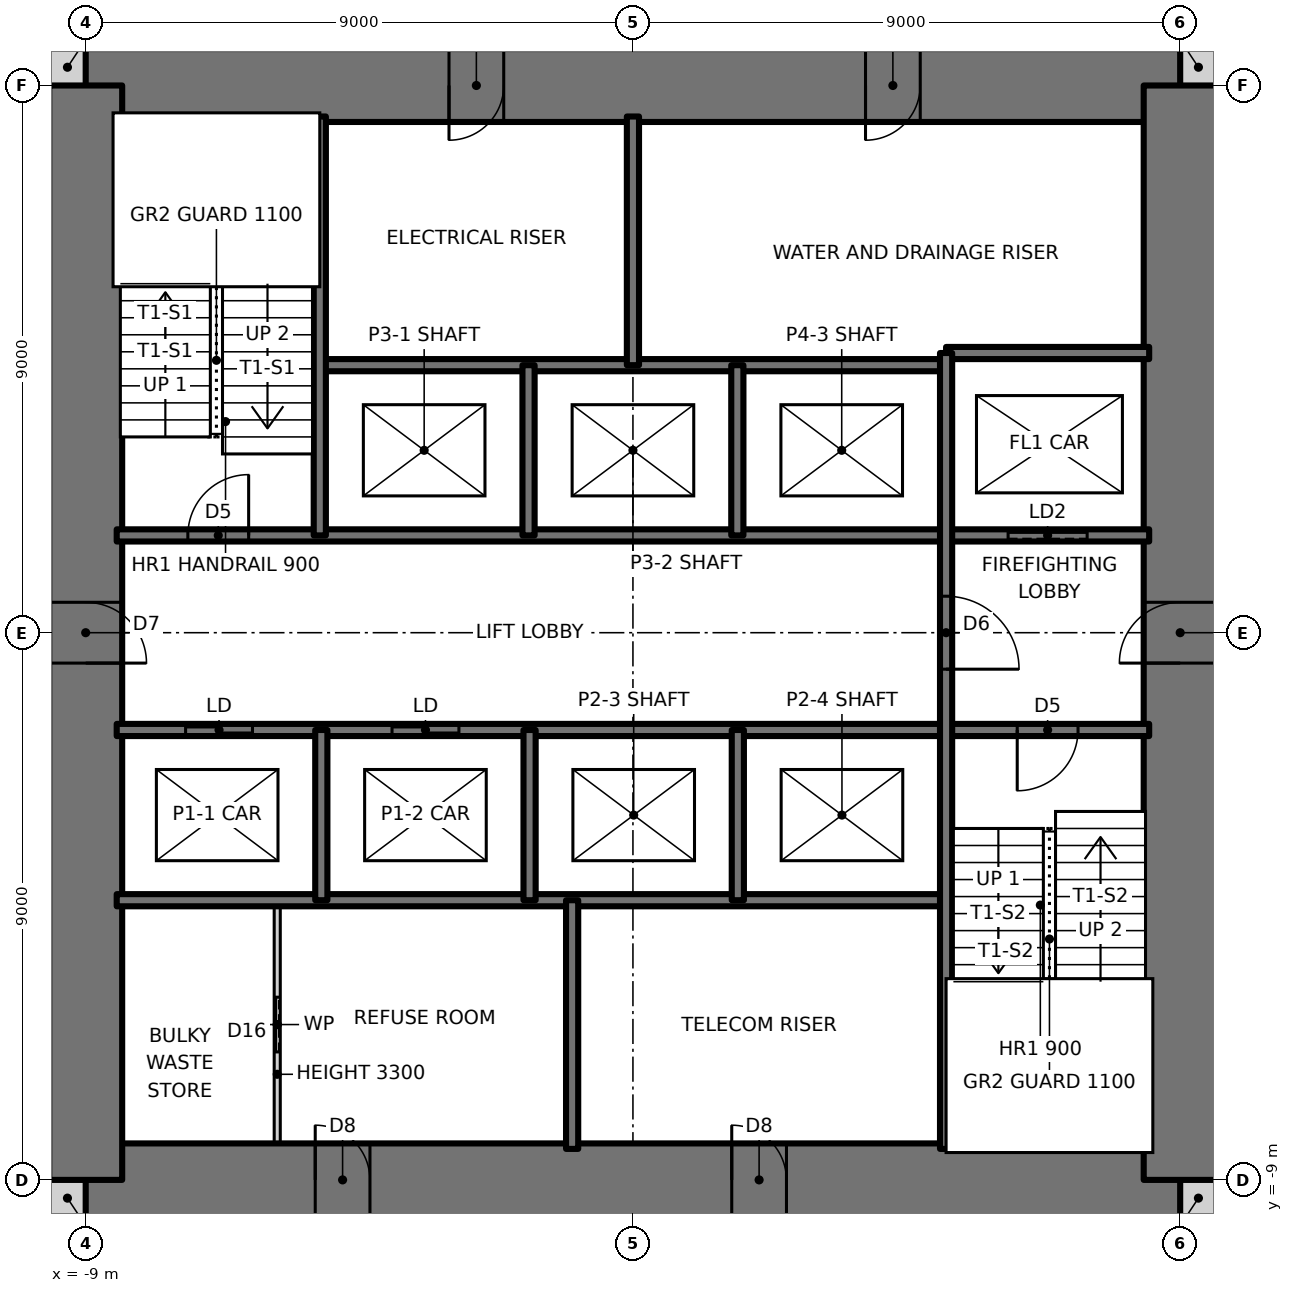
"""IFC4 building model, lengths in metres.
Left out: names, types, materials, properties, quantities, classifications, styles, units other than length and angle.
Written with IfcOpenShell. Run it as: python <this file> out.ifc"""

import sys

from ifc_helpers import new_model, si_unit, direction, frame, frame_2d, origin, place, context, subcontext, project, spatial, rectangle, extrude, element, fill, save


model = new_model("IFC4")
c1 = context("Model", 3, precision=1e-05, world=origin(), true_north=direction((0.0, 1.0)))
c2 = subcontext(c1, "Body", "Model", "MODEL_VIEW")
j1 = project(units=[si_unit("LENGTHUNIT", "METRE"), si_unit("PLANEANGLEUNIT", "RADIAN")], contexts=[c1])
p1 = place(None, origin())
s1 = spatial("IfcSite", under=j1, at=p1, CompositionType="ELEMENT")
p2 = place(p1, origin())
s2 = spatial("IfcBuilding", under=s1, at=p2, CompositionType="ELEMENT")
p3 = place(p2, frame((0.0, 0.0, 57.0)))
s3 = spatial("IfcBuildingStorey", under=s2, at=p3, CompositionType="ELEMENT", Elevation=57.0)
for number, where, z_axis, x_axis in (
    (1, (-9.6, -9.3, 0.0), (0.0, 0.0, 1.0), (1.0, 0.0, 0.0)),
    (2, (9.0, -9.3, 0.0), (0.0, 0.0, 1.0), (1.0, 0.0, 0.0)),
    (3, (9.0, 9.3, 0.0), (0.0, 0.0, 1.0), (1.0, 0.0, 0.0)),
    (4, (-9.6, 9.3, 0.0), (0.0, 0.0, 1.0), (1.0, 0.0, 0.0)),
):
    element("IfcWall", number, at=place(p3, frame(where, z_axis=z_axis, x_axis=x_axis)), inside=s3, PredefinedType="SOLIDWALL", context=c2, shape_type="SweptSolid", body=[
        extrude(rectangle(XDim=0.6, YDim=0.6, at=frame_2d((0.3, 0.0))), origin(), (0.0, 0.0, 1.0), 3.5),
    ])
p4 = place(p3, frame((-9.0, -9.0, 0.0), z_axis=(0.0, 0.0, 1.0), x_axis=(1.0, 0.0, 0.0)))
e5 = element("IfcWall", 5, at=p4, inside=s3, PredefinedType="SHEAR", context=c2, shape_type="SweptSolid", body=[
    extrude(rectangle(XDim=18.0, YDim=1.2, at=frame_2d((9.0, 0.0))), origin(), (0.0, 0.0, 1.0), 3.5),
])
p5 = place(p4, frame((3.775, 0.0, 0.0)))
e6 = element("IfcOpeningElement", 6, at=p5, cuts=e5, PredefinedType="OPENING", context=c2, shape_type="SweptSolid", body=[
    extrude(rectangle(XDim=0.9, YDim=2.1, at=frame_2d((0.45, 1.05))), frame((0.0, 0.61, 0.0), z_axis=(0.0, -1.0, 0.0), x_axis=(1.0, 0.0, 0.0)), (0.0, 0.0, 1.0), 1.22),
])
p6 = place(p4, frame((10.625, 0.0, 0.0)))
e7 = element("IfcOpeningElement", 7, at=p6, cuts=e5, PredefinedType="OPENING", context=c2, shape_type="SweptSolid", body=[
    extrude(rectangle(XDim=0.9, YDim=2.1, at=frame_2d((0.45, 1.05))), frame((0.0, 0.61, 0.0), z_axis=(0.0, -1.0, 0.0), x_axis=(1.0, 0.0, 0.0)), (0.0, 0.0, 1.0), 1.22),
])
p7 = place(p3, frame((9.0, 9.0, 0.0), z_axis=(0.0, 0.0, 1.0), x_axis=(-1.0, 0.0, 0.0)))
e8 = element("IfcWall", 8, at=p7, inside=s3, PredefinedType="SHEAR", context=c2, shape_type="SweptSolid", body=[
    extrude(rectangle(XDim=18.0, YDim=1.2, at=frame_2d((9.0, 0.0))), origin(), (0.0, 0.0, 1.0), 3.5),
])
p8 = place(p7, frame((11.125, 0.0, 0.0)))
e9 = element("IfcOpeningElement", 9, at=p8, cuts=e8, PredefinedType="OPENING", context=c2, shape_type="SweptSolid", body=[
    extrude(rectangle(XDim=0.9, YDim=2.1, at=frame_2d((0.45, 1.05))), frame((0.0, 0.61, 0.0), z_axis=(0.0, -1.0, 0.0), x_axis=(1.0, 0.0, 0.0)), (0.0, 0.0, 1.0), 1.22),
])
p9 = place(p7, frame((4.275, 0.0, 0.0)))
e10 = element("IfcOpeningElement", 10, at=p9, cuts=e8, PredefinedType="OPENING", context=c2, shape_type="SweptSolid", body=[
    extrude(rectangle(XDim=0.9, YDim=2.1, at=frame_2d((0.45, 1.05))), frame((0.0, 0.61, 0.0), z_axis=(0.0, -1.0, 0.0), x_axis=(1.0, 0.0, 0.0)), (0.0, 0.0, 1.0), 1.22),
])
p10 = place(p3, frame((9.0, -9.0, 0.0), z_axis=(0.0, 0.0, 1.0), x_axis=(0.0, 1.0, 0.0)))
e11 = element("IfcWall", 11, at=p10, inside=s3, PredefinedType="SHEAR", context=c2, shape_type="SweptSolid", body=[
    extrude(rectangle(XDim=18.0, YDim=1.2, at=frame_2d((9.0, 0.0))), origin(), (0.0, 0.0, 1.0), 3.5),
])
p11 = place(p10, frame((8.5, 0.0, 0.0)))
e12 = element("IfcOpeningElement", 12, at=p11, cuts=e11, PredefinedType="OPENING", context=c2, shape_type="SweptSolid", body=[
    extrude(rectangle(XDim=1.0, YDim=2.1, at=frame_2d((0.5, 1.05))), frame((0.0, 0.61, 0.0), z_axis=(0.0, -1.0, 0.0), x_axis=(1.0, 0.0, 0.0)), (0.0, 0.0, 1.0), 1.22),
])
p12 = place(p3, frame((-9.0, 9.0, 0.0), z_axis=(0.0, 0.0, 1.0), x_axis=(0.0, -1.0, 0.0)))
e13 = element("IfcWall", 13, at=p12, inside=s3, PredefinedType="SHEAR", context=c2, shape_type="SweptSolid", body=[
    extrude(rectangle(XDim=18.0, YDim=1.2, at=frame_2d((9.0, 0.0))), origin(), (0.0, 0.0, 1.0), 3.5),
])
p13 = place(p12, frame((8.5, 0.0, 0.0)))
e14 = element("IfcOpeningElement", 14, at=p13, cuts=e13, PredefinedType="OPENING", context=c2, shape_type="SweptSolid", body=[
    extrude(rectangle(XDim=1.0, YDim=2.1, at=frame_2d((0.5, 1.05))), frame((0.0, 0.61, 0.0), z_axis=(0.0, -1.0, 0.0), x_axis=(1.0, 0.0, 0.0)), (0.0, 0.0, 1.0), 1.22),
])
p14 = place(p3, frame((-8.49, -4.4, 0.0), z_axis=(0.0, 0.0, 1.0), x_axis=(1.0, 0.0, 0.0)))
e15 = element("IfcWall", 15, at=p14, inside=s3, PredefinedType="SOLIDWALL", context=c2, shape_type="SweptSolid", body=[
    extrude(rectangle(XDim=13.64, YDim=0.2, at=frame_2d((6.82, 0.0))), origin(), (0.0, 0.0, 1.0), 3.5),
])
p15 = place(p3, frame((-8.49, -1.6, 0.0), z_axis=(0.0, 0.0, 1.0), x_axis=(1.0, 0.0, 0.0)))
e16 = element("IfcWall", 16, at=p15, inside=s3, PredefinedType="SOLIDWALL", context=c2, shape_type="SweptSolid", body=[
    extrude(rectangle(XDim=16.98, YDim=0.2, at=frame_2d((8.49, 0.0))), origin(), (0.0, 0.0, 1.0), 3.5),
])
p16 = place(p15, frame((14.81, 0.0, 0.0)))
e17 = element("IfcOpeningElement", 17, at=p16, cuts=e16, PredefinedType="OPENING", context=c2, shape_type="SweptSolid", body=[
    extrude(rectangle(XDim=1.0, YDim=2.1, at=frame_2d((0.5, 1.05))), frame((0.0, 0.11, 0.0), z_axis=(0.0, -1.0, 0.0), x_axis=(1.0, 0.0, 0.0)), (0.0, 0.0, 1.0), 0.22),
])
p17 = place(p15, frame((1.133, 0.0, 0.0)))
e18 = element("IfcOpeningElement", 18, at=p17, cuts=e16, PredefinedType="OPENING", context=c2, shape_type="SweptSolid", body=[
    extrude(rectangle(XDim=1.1, YDim=2.1, at=frame_2d((0.55, 1.05))), frame((0.0, 0.11, 0.0), z_axis=(0.0, -1.0, 0.0), x_axis=(1.0, 0.0, 0.0)), (0.0, 0.0, 1.0), 0.22),
])
p18 = place(p15, frame((4.528, 0.0, 0.0)))
e19 = element("IfcOpeningElement", 19, at=p18, cuts=e16, PredefinedType="OPENING", context=c2, shape_type="SweptSolid", body=[
    extrude(rectangle(XDim=1.1, YDim=2.1, at=frame_2d((0.55, 1.05))), frame((0.0, 0.11, 0.0), z_axis=(0.0, -1.0, 0.0), x_axis=(1.0, 0.0, 0.0)), (0.0, 0.0, 1.0), 0.22),
])
p19 = place(p3, frame((-8.49, 1.6, 0.0), z_axis=(0.0, 0.0, 1.0), x_axis=(1.0, 0.0, 0.0)))
e20 = element("IfcWall", 20, at=p19, inside=s3, PredefinedType="SOLIDWALL", context=c2, shape_type="SweptSolid", body=[
    extrude(rectangle(XDim=16.98, YDim=0.2, at=frame_2d((8.49, 0.0))), origin(), (0.0, 0.0, 1.0), 3.5),
])
p20 = place(p19, frame((1.17, 0.0, 0.0)))
e21 = element("IfcOpeningElement", 21, at=p20, cuts=e20, PredefinedType="OPENING", context=c2, shape_type="SweptSolid", body=[
    extrude(rectangle(XDim=1.0, YDim=2.1, at=frame_2d((0.5, 1.05))), frame((0.0, 0.11, 0.0), z_axis=(0.0, -1.0, 0.0), x_axis=(1.0, 0.0, 0.0)), (0.0, 0.0, 1.0), 0.22),
])
p21 = place(p19, frame((14.66, 0.0, 0.0)))
e22 = element("IfcOpeningElement", 22, at=p21, cuts=e20, PredefinedType="OPENING", context=c2, shape_type="SweptSolid", body=[
    extrude(rectangle(XDim=1.3, YDim=2.1, at=frame_2d((0.65, 1.05))), frame((0.0, 0.11, 0.0), z_axis=(0.0, -1.0, 0.0), x_axis=(1.0, 0.0, 0.0)), (0.0, 0.0, 1.0), 0.22),
])
p22 = place(p3, frame((-5.15, 4.4, 0.0), z_axis=(0.0, 0.0, 1.0), x_axis=(1.0, 0.0, 0.0)))
e23 = element("IfcWall", 23, at=p22, inside=s3, PredefinedType="SOLIDWALL", context=c2, shape_type="SweptSolid", body=[
    extrude(rectangle(XDim=10.3, YDim=0.2, at=frame_2d((5.15, 0.0))), origin(), (0.0, 0.0, 1.0), 3.5),
])
p23 = place(p3, frame((5.15, 4.6, 0.0), z_axis=(0.0, 0.0, 1.0), x_axis=(1.0, 0.0, 0.0)))
e24 = element("IfcWall", 24, at=p23, inside=s3, PredefinedType="SOLIDWALL", context=c2, shape_type="SweptSolid", body=[
    extrude(rectangle(XDim=3.34, YDim=0.2, at=frame_2d((1.67, 0.0))), origin(), (0.0, 0.0, 1.0), 3.5),
])
p24 = place(p3, frame((5.15, -8.49, 0.0), z_axis=(0.0, 0.0, 1.0), x_axis=(0.0, 1.0, 0.0)))
e25 = element("IfcWall", 25, at=p24, inside=s3, PredefinedType="SOLIDWALL", context=c2, shape_type="SweptSolid", body=[
    extrude(rectangle(XDim=13.09, YDim=0.2, at=frame_2d((6.545, 0.0))), origin(), (0.0, 0.0, 1.0), 3.5),
])
p25 = place(p24, frame((7.89, 0.0, 0.0)))
e26 = element("IfcOpeningElement", 26, at=p25, cuts=e25, PredefinedType="OPENING", context=c2, shape_type="SweptSolid", body=[
    extrude(rectangle(XDim=1.2, YDim=2.1, at=frame_2d((0.6, 1.05))), frame((0.0, 0.11, 0.0), z_axis=(0.0, -1.0, 0.0), x_axis=(1.0, 0.0, 0.0)), (0.0, 0.0, 1.0), 0.22),
])
for number, where, z_axis, x_axis in (
    (27, (1.725, -4.4, 0.0), (0.0, 0.0, 1.0), (0.0, 1.0, 0.0)),
    (28, (1.717, 1.6, 0.0), (0.0, 0.0, 1.0), (0.0, 1.0, 0.0)),
):
    element("IfcWall", number, at=place(p3, frame(where, z_axis=z_axis, x_axis=x_axis)), inside=s3, PredefinedType="SOLIDWALL", context=c2, shape_type="SweptSolid", body=[
        extrude(rectangle(XDim=2.8, YDim=0.2, at=frame_2d((1.4, 0.0))), origin(), (0.0, 0.0, 1.0), 3.5),
    ])
for number, where, z_axis, x_axis in (
    (29, (0.0, 4.4, 0.0), (0.0, 0.0, 1.0), (0.0, 1.0, 0.0)),
    (30, (-1.0, -8.49, 0.0), (0.0, 0.0, 1.0), (0.0, 1.0, 0.0)),
):
    element("IfcWall", number, at=place(p3, frame(where, z_axis=z_axis, x_axis=x_axis)), inside=s3, PredefinedType="SOLIDWALL", context=c2, shape_type="SweptSolid", body=[
        extrude(rectangle(XDim=4.09, YDim=0.2, at=frame_2d((2.045, 0.0))), origin(), (0.0, 0.0, 1.0), 3.5),
    ])
for number, where, z_axis, x_axis in (
    (31, (-1.7, -4.4, 0.0), (0.0, 0.0, 1.0), (0.0, 1.0, 0.0)),
    (32, (-1.717, 1.6, 0.0), (0.0, 0.0, 1.0), (0.0, 1.0, 0.0)),
    (33, (-5.125, -4.4, 0.0), (0.0, 0.0, 1.0), (0.0, 1.0, 0.0)),
):
    element("IfcWall", number, at=place(p3, frame(where, z_axis=z_axis, x_axis=x_axis)), inside=s3, PredefinedType="SOLIDWALL", context=c2, shape_type="SweptSolid", body=[
        extrude(rectangle(XDim=2.8, YDim=0.2, at=frame_2d((1.4, 0.0))), origin(), (0.0, 0.0, 1.0), 3.5),
    ])
p26 = place(p3, frame((-5.15, 1.6, 0.0), z_axis=(0.0, 0.0, 1.0), x_axis=(0.0, 1.0, 0.0)))
e34 = element("IfcWall", 34, at=p26, inside=s3, PredefinedType="SOLIDWALL", context=c2, shape_type="SweptSolid", body=[
    extrude(rectangle(XDim=6.89, YDim=0.2, at=frame_2d((3.445, 0.0))), origin(), (0.0, 0.0, 1.0), 3.5),
])
p27 = place(p3, frame((-5.85, -8.49, 0.0), z_axis=(0.0, 0.0, 1.0), x_axis=(0.0, 1.0, 0.0)))
e35 = element("IfcWall", 35, at=p27, inside=s3, PredefinedType="PARTITIONING", context=c2, shape_type="SweptSolid", body=[
    extrude(rectangle(XDim=4.09, YDim=0.1, at=frame_2d((2.045, 0.0))), origin(), (0.0, 0.0, 1.0), 3.3),
])
p28 = place(p27, frame((1.595, 0.0, 0.0)))
e36 = element("IfcOpeningElement", 36, at=p28, cuts=e35, PredefinedType="OPENING", context=c2, shape_type="SweptSolid", body=[
    extrude(rectangle(XDim=0.9, YDim=2.1, at=frame_2d((0.45, 1.05))), frame((0.0, 0.06, 0.0), z_axis=(0.0, -1.0, 0.0), x_axis=(1.0, 0.0, 0.0)), (0.0, 0.0, 1.0), 0.12),
])
p29 = place(p20, origin())
e37 = element("IfcDoor", 37, at=p29, inside=s3, OperationType="SINGLE_SWING_RIGHT", PredefinedType="DOOR", context=c2, shape_type="SweptSolid", body=[
    extrude(rectangle(XDim=1.0, YDim=2.1, at=frame_2d((0.5, 1.05))), frame((0.0, 0.025, 0.0), z_axis=(0.0, -1.0, 0.0), x_axis=(1.0, 0.0, 0.0)), (0.0, 0.0, 1.0), 0.05),
])
fill(e21, e37)
p30 = place(p16, frame((1.0, 0.0, 0.0), z_axis=(0.0, 0.0, 1.0), x_axis=(-1.0, 0.0, 0.0)))
e38 = element("IfcDoor", 38, at=p30, inside=s3, OperationType="SINGLE_SWING_RIGHT", PredefinedType="DOOR", context=c2, shape_type="SweptSolid", body=[
    extrude(rectangle(XDim=1.0, YDim=2.1, at=frame_2d((0.5, 1.05))), frame((0.0, 0.025, 0.0), z_axis=(0.0, -1.0, 0.0), x_axis=(1.0, 0.0, 0.0)), (0.0, 0.0, 1.0), 0.05),
])
fill(e17, e38)
p31 = place(p25, frame((1.2, 0.0, 0.0), z_axis=(0.0, 0.0, 1.0), x_axis=(-1.0, 0.0, 0.0)))
e39 = element("IfcDoor", 39, at=p31, inside=s3, OperationType="SINGLE_SWING_RIGHT", PredefinedType="DOOR", context=c2, shape_type="SweptSolid", body=[
    extrude(rectangle(XDim=1.2, YDim=2.1, at=frame_2d((0.6, 1.05))), frame((0.0, 0.025, 0.0), z_axis=(0.0, -1.0, 0.0), x_axis=(1.0, 0.0, 0.0)), (0.0, 0.0, 1.0), 0.05),
])
fill(e26, e39)
p32 = place(p28, origin())
e40 = element("IfcDoor", 40, at=p32, inside=s3, OperationType="SLIDING_TO_LEFT", PredefinedType="DOOR", context=c2, shape_type="SweptSolid", body=[
    extrude(rectangle(XDim=0.9, YDim=2.1, at=frame_2d((0.45, 1.05))), frame((0.0, 0.025, 0.0), z_axis=(0.0, -1.0, 0.0), x_axis=(1.0, 0.0, 0.0)), (0.0, 0.0, 1.0), 0.05),
])
fill(e36, e40)
p33 = place(p13, origin())
e41 = element("IfcDoor", 41, at=p33, inside=s3, OperationType="SINGLE_SWING_RIGHT", PredefinedType="DOOR", context=c2, shape_type="SweptSolid", body=[
    extrude(rectangle(XDim=1.0, YDim=2.1, at=frame_2d((0.5, 1.05))), frame((0.0, 0.025, 0.0), z_axis=(0.0, -1.0, 0.0), x_axis=(1.0, 0.0, 0.0)), (0.0, 0.0, 1.0), 0.05),
])
fill(e14, e41)
p34 = place(p11, origin())
e42 = element("IfcDoor", 42, at=p34, inside=s3, OperationType="SINGLE_SWING_LEFT", PredefinedType="DOOR", context=c2, shape_type="SweptSolid", body=[
    extrude(rectangle(XDim=1.0, YDim=2.1, at=frame_2d((0.5, 1.05))), frame((0.0, 0.025, 0.0), z_axis=(0.0, -1.0, 0.0), x_axis=(1.0, 0.0, 0.0)), (0.0, 0.0, 1.0), 0.05),
])
fill(e12, e42)
p35 = place(p8, origin())
e43 = element("IfcDoor", 43, at=p35, inside=s3, OperationType="SINGLE_SWING_RIGHT", PredefinedType="DOOR", context=c2, shape_type="SweptSolid", body=[
    extrude(rectangle(XDim=0.9, YDim=2.1, at=frame_2d((0.45, 1.05))), frame((0.0, 0.025, 0.0), z_axis=(0.0, -1.0, 0.0), x_axis=(1.0, 0.0, 0.0)), (0.0, 0.0, 1.0), 0.05),
])
fill(e9, e43)
p36 = place(p9, origin())
e44 = element("IfcDoor", 44, at=p36, inside=s3, OperationType="SINGLE_SWING_RIGHT", PredefinedType="DOOR", context=c2, shape_type="SweptSolid", body=[
    extrude(rectangle(XDim=0.9, YDim=2.1, at=frame_2d((0.45, 1.05))), frame((0.0, 0.025, 0.0), z_axis=(0.0, -1.0, 0.0), x_axis=(1.0, 0.0, 0.0)), (0.0, 0.0, 1.0), 0.05),
])
fill(e10, e44)
p37 = place(p5, origin())
e45 = element("IfcDoor", 45, at=p37, inside=s3, OperationType="SINGLE_SWING_LEFT", PredefinedType="DOOR", context=c2, shape_type="SweptSolid", body=[
    extrude(rectangle(XDim=0.9, YDim=2.1, at=frame_2d((0.45, 1.05))), frame((0.0, 0.025, 0.0), z_axis=(0.0, -1.0, 0.0), x_axis=(1.0, 0.0, 0.0)), (0.0, 0.0, 1.0), 0.05),
])
fill(e6, e45)
p38 = place(p6, origin())
e46 = element("IfcDoor", 46, at=p38, inside=s3, OperationType="SINGLE_SWING_LEFT", PredefinedType="DOOR", context=c2, shape_type="SweptSolid", body=[
    extrude(rectangle(XDim=0.9, YDim=2.1, at=frame_2d((0.45, 1.05))), frame((0.0, 0.025, 0.0), z_axis=(0.0, -1.0, 0.0), x_axis=(1.0, 0.0, 0.0)), (0.0, 0.0, 1.0), 0.05),
])
fill(e7, e46)
p39 = place(p17, origin())
e47 = element("IfcDoor", 47, at=p39, inside=s3, OperationType="DOUBLE_DOOR_SLIDING", PredefinedType="DOOR", context=c2, shape_type="SweptSolid", body=[
    extrude(rectangle(XDim=1.1, YDim=2.1, at=frame_2d((0.55, 1.05))), frame((0.0, 0.025, 0.0), z_axis=(0.0, -1.0, 0.0), x_axis=(1.0, 0.0, 0.0)), (0.0, 0.0, 1.0), 0.05),
])
fill(e18, e47)
p40 = place(p18, origin())
e48 = element("IfcDoor", 48, at=p40, inside=s3, OperationType="DOUBLE_DOOR_SLIDING", PredefinedType="DOOR", context=c2, shape_type="SweptSolid", body=[
    extrude(rectangle(XDim=1.1, YDim=2.1, at=frame_2d((0.55, 1.05))), frame((0.0, 0.025, 0.0), z_axis=(0.0, -1.0, 0.0), x_axis=(1.0, 0.0, 0.0)), (0.0, 0.0, 1.0), 0.05),
])
fill(e19, e48)
p41 = place(p21, origin())
e49 = element("IfcDoor", 49, at=p41, inside=s3, OperationType="SLIDING_TO_LEFT", PredefinedType="DOOR", context=c2, shape_type="SweptSolid", body=[
    extrude(rectangle(XDim=1.3, YDim=2.1, at=frame_2d((0.65, 1.05))), frame((0.0, 0.025, 0.0), z_axis=(0.0, -1.0, 0.0), x_axis=(1.0, 0.0, 0.0)), (0.0, 0.0, 1.0), 0.05),
])
fill(e22, e49)
save(model, sys.argv[1])
